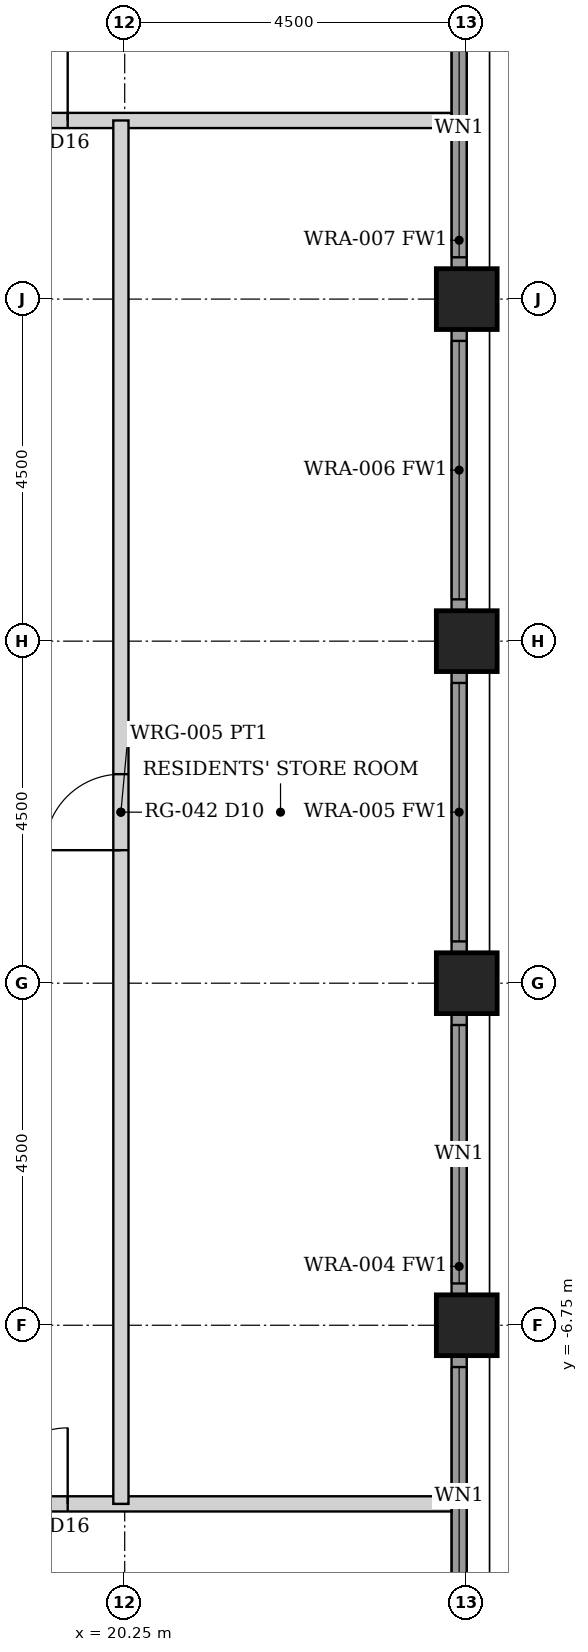
"""IFC4 building model, lengths in metres.
Left out: names, types, materials, properties, quantities, classifications, styles, units other than length and angle.
Written with IfcOpenShell. Run it as: python <this file> out.ifc"""

import sys

from ifc_helpers import new_model, si_unit, direction, frame, frame_2d, origin, origin_2d, place, context, subcontext, project, spatial, rectangle, hollow_rectangle, extrude, element, fill, save


model = new_model("IFC4")
c1 = context("Model", 3, precision=1e-05, world=origin(), true_north=direction((0.0, 1.0)))
c2 = subcontext(c1, "Body", "Model", "MODEL_VIEW")
j1 = project(units=[si_unit("LENGTHUNIT", "METRE"), si_unit("PLANEANGLEUNIT", "RADIAN")], contexts=[c1])
p1 = place(None, origin())
s1 = spatial("IfcSite", under=j1, at=p1, CompositionType="ELEMENT")
p2 = place(p1, origin())
s2 = spatial("IfcBuilding", under=s1, at=p2, CompositionType="ELEMENT")
p3 = place(p2, frame((0.0, 0.0, 89.5)))
s3 = spatial("IfcBuildingStorey", under=s2, at=p3, CompositionType="ELEMENT", Elevation=89.5)
for number, where, z_axis, x_axis in (
    (1, (24.75, -6.75, 0.0), (0.0, 0.0, 1.0), (1.0, 0.0, 0.0)),
    (2, (24.75, -2.25, 0.0), (0.0, 0.0, 1.0), (1.0, 0.0, 0.0)),
    (3, (24.75, 2.25, 0.0), (0.0, 0.0, 1.0), (1.0, 0.0, 0.0)),
    (4, (24.75, 6.75, 0.0), (0.0, 0.0, 1.0), (1.0, 0.0, 0.0)),
):
    element("IfcColumn", number, at=place(p3, frame(where, z_axis=z_axis, x_axis=x_axis)), inside=s3, PredefinedType="COLUMN", context=c2, shape_type="SweptSolid", body=[
        extrude(hollow_rectangle(XDim=0.8, YDim=0.8, WallThickness=0.06, at=origin_2d()), origin(), (0.0, 0.0, 1.0), 3.5),
    ])
p4 = place(p3, frame((24.65, -10.845, 0.0), z_axis=(0.0, 0.0, 1.0), x_axis=(0.0, 1.0, 0.0)))
e5 = element("IfcWall", 5, at=p4, inside=s3, PredefinedType="SOLIDWALL", context=c2, shape_type="SweptSolid", body=[
    extrude(rectangle(XDim=3.69, YDim=0.2, at=frame_2d((1.845, 0.0))), origin(), (0.0, 0.0, 1.0), 2.379),
])
p5 = place(p4, frame((0.145, 0.0, 0.3)))
e6 = element("IfcOpeningElement", 6, at=p5, cuts=e5, PredefinedType="OPENING", context=c2, shape_type="SweptSolid", body=[
    extrude(rectangle(XDim=3.4, YDim=1.929, at=frame_2d((1.7, 0.964))), frame((0.0, 0.11, 0.0), z_axis=(0.0, -1.0, 0.0), x_axis=(1.0, 0.0, 0.0)), (0.0, 0.0, 1.0), 0.22),
])
p6 = place(p3, frame((24.65, -6.345, 0.0), z_axis=(0.0, 0.0, 1.0), x_axis=(0.0, 1.0, 0.0)))
e7 = element("IfcWall", 7, at=p6, inside=s3, PredefinedType="SOLIDWALL", context=c2, shape_type="SweptSolid", body=[
    extrude(rectangle(XDim=3.69, YDim=0.2, at=frame_2d((1.845, 0.0))), origin(), (0.0, 0.0, 1.0), 2.379),
])
p7 = place(p6, frame((0.145, 0.0, 0.3)))
e8 = element("IfcOpeningElement", 8, at=p7, cuts=e7, PredefinedType="OPENING", context=c2, shape_type="SweptSolid", body=[
    extrude(rectangle(XDim=3.4, YDim=1.929, at=frame_2d((1.7, 0.964))), frame((0.0, 0.11, 0.0), z_axis=(0.0, -1.0, 0.0), x_axis=(1.0, 0.0, 0.0)), (0.0, 0.0, 1.0), 0.22),
])
p8 = place(p3, frame((24.65, -1.845, 0.0), z_axis=(0.0, 0.0, 1.0), x_axis=(0.0, 1.0, 0.0)))
e9 = element("IfcWall", 9, at=p8, inside=s3, PredefinedType="SOLIDWALL", context=c2, shape_type="SweptSolid", body=[
    extrude(rectangle(XDim=3.69, YDim=0.2, at=frame_2d((1.845, 0.0))), origin(), (0.0, 0.0, 1.0), 2.379),
])
p9 = place(p8, frame((0.145, 0.0, 0.3)))
e10 = element("IfcOpeningElement", 10, at=p9, cuts=e9, PredefinedType="OPENING", context=c2, shape_type="SweptSolid", body=[
    extrude(rectangle(XDim=3.4, YDim=1.929, at=frame_2d((1.7, 0.964))), frame((0.0, 0.11, 0.0), z_axis=(0.0, -1.0, 0.0), x_axis=(1.0, 0.0, 0.0)), (0.0, 0.0, 1.0), 0.22),
])
p10 = place(p3, frame((24.65, 2.655, 0.0), z_axis=(0.0, 0.0, 1.0), x_axis=(0.0, 1.0, 0.0)))
e11 = element("IfcWall", 11, at=p10, inside=s3, PredefinedType="SOLIDWALL", context=c2, shape_type="SweptSolid", body=[
    extrude(rectangle(XDim=3.69, YDim=0.2, at=frame_2d((1.845, 0.0))), origin(), (0.0, 0.0, 1.0), 2.379),
])
p11 = place(p10, frame((0.145, 0.0, 0.3)))
e12 = element("IfcOpeningElement", 12, at=p11, cuts=e11, PredefinedType="OPENING", context=c2, shape_type="SweptSolid", body=[
    extrude(rectangle(XDim=3.4, YDim=1.929, at=frame_2d((1.7, 0.964))), frame((0.0, 0.11, 0.0), z_axis=(0.0, -1.0, 0.0), x_axis=(1.0, 0.0, 0.0)), (0.0, 0.0, 1.0), 0.22),
])
p12 = place(p3, frame((24.65, 7.155, 0.0), z_axis=(0.0, 0.0, 1.0), x_axis=(0.0, 1.0, 0.0)))
e13 = element("IfcWall", 13, at=p12, inside=s3, PredefinedType="SOLIDWALL", context=c2, shape_type="SweptSolid", body=[
    extrude(rectangle(XDim=3.69, YDim=0.2, at=frame_2d((1.845, 0.0))), origin(), (0.0, 0.0, 1.0), 2.379),
])
p13 = place(p12, frame((0.145, 0.0, 0.3)))
e14 = element("IfcOpeningElement", 14, at=p13, cuts=e13, PredefinedType="OPENING", context=c2, shape_type="SweptSolid", body=[
    extrude(rectangle(XDim=3.4, YDim=1.929, at=frame_2d((1.7, 0.964))), frame((0.0, 0.11, 0.0), z_axis=(0.0, -1.0, 0.0), x_axis=(1.0, 0.0, 0.0)), (0.0, 0.0, 1.0), 0.22),
])
p14 = place(p3, frame((-24.55, 9.1, 0.0), z_axis=(0.0, 0.0, 1.0), x_axis=(1.0, 0.0, 0.0)))
e15 = element("IfcWall", 15, at=p14, inside=s3, PredefinedType="PARTITIONING", context=c2, shape_type="SweptSolid", body=[
    extrude(rectangle(XDim=49.1, YDim=0.2, at=frame_2d((24.55, 0.0))), origin(), (0.0, 0.0, 1.0), 2.373),
])
p15 = place(p14, frame((5.05, 0.0, 0.0)))
e16 = element("IfcOpeningElement", 16, at=p15, cuts=e15, PredefinedType="OPENING", context=c2, shape_type="SweptSolid", body=[
    extrude(rectangle(XDim=1.0, YDim=2.3, at=frame_2d((0.5, 1.15))), frame((0.0, 0.11, 0.0), z_axis=(0.0, -1.0, 0.0), x_axis=(1.0, 0.0, 0.0)), (0.0, 0.0, 1.0), 0.22),
])
p16 = place(p14, frame((18.05, 0.0, 0.0)))
e17 = element("IfcOpeningElement", 17, at=p16, cuts=e15, PredefinedType="OPENING", context=c2, shape_type="SweptSolid", body=[
    extrude(rectangle(XDim=1.0, YDim=2.3, at=frame_2d((0.5, 1.15))), frame((0.0, 0.11, 0.0), z_axis=(0.0, -1.0, 0.0), x_axis=(1.0, 0.0, 0.0)), (0.0, 0.0, 1.0), 0.22),
])
p17 = place(p14, frame((43.05, 0.0, 0.0)))
e18 = element("IfcOpeningElement", 18, at=p17, cuts=e15, PredefinedType="OPENING", context=c2, shape_type="SweptSolid", body=[
    extrude(rectangle(XDim=1.0, YDim=2.3, at=frame_2d((0.5, 1.15))), frame((0.0, 0.11, 0.0), z_axis=(0.0, -1.0, 0.0), x_axis=(1.0, 0.0, 0.0)), (0.0, 0.0, 1.0), 0.22),
])
p18 = place(p3, frame((-24.55, -9.1, 0.0), z_axis=(0.0, 0.0, 1.0), x_axis=(1.0, 0.0, 0.0)))
e19 = element("IfcWall", 19, at=p18, inside=s3, PredefinedType="PARTITIONING", context=c2, shape_type="SweptSolid", body=[
    extrude(rectangle(XDim=49.1, YDim=0.2, at=frame_2d((24.55, 0.0))), origin(), (0.0, 0.0, 1.0), 2.373),
])
p19 = place(p18, frame((5.05, 0.0, 0.0)))
e20 = element("IfcOpeningElement", 20, at=p19, cuts=e19, PredefinedType="OPENING", context=c2, shape_type="SweptSolid", body=[
    extrude(rectangle(XDim=1.0, YDim=2.3, at=frame_2d((0.5, 1.15))), frame((0.0, 0.11, 0.0), z_axis=(0.0, -1.0, 0.0), x_axis=(1.0, 0.0, 0.0)), (0.0, 0.0, 1.0), 0.22),
])
p20 = place(p18, frame((18.05, 0.0, 0.0)))
e21 = element("IfcOpeningElement", 21, at=p20, cuts=e19, PredefinedType="OPENING", context=c2, shape_type="SweptSolid", body=[
    extrude(rectangle(XDim=1.0, YDim=2.3, at=frame_2d((0.5, 1.15))), frame((0.0, 0.11, 0.0), z_axis=(0.0, -1.0, 0.0), x_axis=(1.0, 0.0, 0.0)), (0.0, 0.0, 1.0), 0.22),
])
p21 = place(p18, frame((43.05, 0.0, 0.0)))
e22 = element("IfcOpeningElement", 22, at=p21, cuts=e19, PredefinedType="OPENING", context=c2, shape_type="SweptSolid", body=[
    extrude(rectangle(XDim=1.0, YDim=2.3, at=frame_2d((0.5, 1.15))), frame((0.0, 0.11, 0.0), z_axis=(0.0, -1.0, 0.0), x_axis=(1.0, 0.0, 0.0)), (0.0, 0.0, 1.0), 0.22),
])
p22 = place(p3, frame((20.2, -9.1, 0.0), z_axis=(0.0, 0.0, 1.0), x_axis=(0.0, 1.0, 0.0)))
e23 = element("IfcWall", 23, at=p22, inside=s3, PredefinedType="PARTITIONING", context=c2, shape_type="SweptSolid", body=[
    extrude(rectangle(XDim=18.2, YDim=0.2, at=frame_2d((9.1, 0.0))), origin(), (0.0, 0.0, 1.0), 2.373),
])
p23 = place(p22, frame((8.6, 0.0, 0.0)))
e24 = element("IfcOpeningElement", 24, at=p23, cuts=e23, PredefinedType="OPENING", context=c2, shape_type="SweptSolid", body=[
    extrude(rectangle(XDim=1.0, YDim=2.1, at=frame_2d((0.5, 1.05))), frame((0.0, 0.11, 0.0), z_axis=(0.0, -1.0, 0.0), x_axis=(1.0, 0.0, 0.0)), (0.0, 0.0, 1.0), 0.22),
])
p24 = place(p5, origin())
e25 = element("IfcWindow", 25, at=p24, inside=s3, PartitioningType="SINGLE_PANEL", PredefinedType="WINDOW", context=c2, shape_type="SweptSolid", body=[
    extrude(rectangle(XDim=3.4, YDim=1.929, at=frame_2d((1.7, 0.964))), frame((0.0, 0.03, 0.0), z_axis=(0.0, -1.0, 0.0), x_axis=(1.0, 0.0, 0.0)), (0.0, 0.0, 1.0), 0.06),
])
fill(e6, e25)
p25 = place(p7, origin())
e26 = element("IfcWindow", 26, at=p25, inside=s3, PartitioningType="SINGLE_PANEL", PredefinedType="WINDOW", context=c2, shape_type="SweptSolid", body=[
    extrude(rectangle(XDim=3.4, YDim=1.929, at=frame_2d((1.7, 0.964))), frame((0.0, 0.03, 0.0), z_axis=(0.0, -1.0, 0.0), x_axis=(1.0, 0.0, 0.0)), (0.0, 0.0, 1.0), 0.06),
])
fill(e8, e26)
p26 = place(p9, origin())
e27 = element("IfcWindow", 27, at=p26, inside=s3, PartitioningType="SINGLE_PANEL", PredefinedType="WINDOW", context=c2, shape_type="SweptSolid", body=[
    extrude(rectangle(XDim=3.4, YDim=1.929, at=frame_2d((1.7, 0.964))), frame((0.0, 0.03, 0.0), z_axis=(0.0, -1.0, 0.0), x_axis=(1.0, 0.0, 0.0)), (0.0, 0.0, 1.0), 0.06),
])
fill(e10, e27)
p27 = place(p11, origin())
e28 = element("IfcWindow", 28, at=p27, inside=s3, PartitioningType="SINGLE_PANEL", PredefinedType="WINDOW", context=c2, shape_type="SweptSolid", body=[
    extrude(rectangle(XDim=3.4, YDim=1.929, at=frame_2d((1.7, 0.964))), frame((0.0, 0.03, 0.0), z_axis=(0.0, -1.0, 0.0), x_axis=(1.0, 0.0, 0.0)), (0.0, 0.0, 1.0), 0.06),
])
fill(e12, e28)
p28 = place(p13, origin())
e29 = element("IfcWindow", 29, at=p28, inside=s3, PartitioningType="SINGLE_PANEL", PredefinedType="WINDOW", context=c2, shape_type="SweptSolid", body=[
    extrude(rectangle(XDim=3.4, YDim=1.929, at=frame_2d((1.7, 0.964))), frame((0.0, 0.03, 0.0), z_axis=(0.0, -1.0, 0.0), x_axis=(1.0, 0.0, 0.0)), (0.0, 0.0, 1.0), 0.06),
])
fill(e14, e29)
p29 = place(p17, origin())
e30 = element("IfcDoor", 30, at=p29, inside=s3, OperationType="SINGLE_SWING_RIGHT", PredefinedType="DOOR", context=c2, shape_type="SweptSolid", body=[
    extrude(rectangle(XDim=1.0, YDim=2.3, at=frame_2d((0.5, 1.15))), frame((0.0, 0.025, 0.0), z_axis=(0.0, -1.0, 0.0), x_axis=(1.0, 0.0, 0.0)), (0.0, 0.0, 1.0), 0.05),
])
fill(e18, e30)
p30 = place(p21, origin())
e31 = element("IfcDoor", 31, at=p30, inside=s3, OperationType="SINGLE_SWING_RIGHT", PredefinedType="DOOR", context=c2, shape_type="SweptSolid", body=[
    extrude(rectangle(XDim=1.0, YDim=2.3, at=frame_2d((0.5, 1.15))), frame((0.0, 0.025, 0.0), z_axis=(0.0, -1.0, 0.0), x_axis=(1.0, 0.0, 0.0)), (0.0, 0.0, 1.0), 0.05),
])
fill(e22, e31)
p31 = place(p23, origin())
e32 = element("IfcDoor", 32, at=p31, inside=s3, OperationType="SINGLE_SWING_LEFT", PredefinedType="DOOR", context=c2, shape_type="SweptSolid", body=[
    extrude(rectangle(XDim=1.0, YDim=2.1, at=frame_2d((0.5, 1.05))), frame((0.0, 0.025, 0.0), z_axis=(0.0, -1.0, 0.0), x_axis=(1.0, 0.0, 0.0)), (0.0, 0.0, 1.0), 0.05),
])
fill(e24, e32)
save(model, sys.argv[1])
